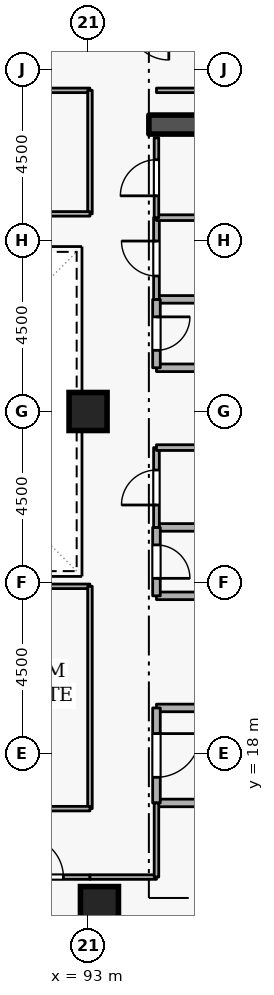
"""IFC4 building model, lengths in metres.
Left out: names, types, materials, properties, quantities, classifications, styles, units other than length and angle.
Written with IfcOpenShell. Run it as: python <this file> out.ifc"""

import sys

from ifc_helpers import new_model, si_unit, direction, frame, frame_2d, origin, origin_2d, place, context, subcontext, project, spatial, rectangle, extrude, element, fill, save


model = new_model("IFC4")
c1 = context("Model", 3, precision=1e-05, world=origin(), true_north=direction((0.0, 1.0)))
c2 = subcontext(c1, "Body", "Model", "MODEL_VIEW")
j1 = project(units=[si_unit("LENGTHUNIT", "METRE"), si_unit("PLANEANGLEUNIT", "RADIAN")], contexts=[c1])
p1 = place(None, origin())
s1 = spatial("IfcSite", under=j1, at=p1, CompositionType="ELEMENT")
p2 = place(p1, origin())
s2 = spatial("IfcBuilding", under=s1, at=p2, CompositionType="ELEMENT")
p3 = place(p2, frame((0.0, 0.0, 200.1)))
s3 = spatial("IfcBuildingStorey", under=s2, at=p3, CompositionType="ELEMENT", Elevation=200.1)
p4 = place(p3, frame((94.6, 34.55, 0.0), z_axis=(0.0, 0.0, 1.0), x_axis=(1.0, 0.0, 0.0)))
e1 = element("IfcWall", 1, at=p4, inside=s3, PredefinedType="SHEAR", context=c2, shape_type="SweptSolid", body=[
    extrude(rectangle(XDim=5.8, YDim=0.5, at=frame_2d((2.9, 0.0))), origin(), (0.0, 0.0, 1.0), 3.6),
])
for number, where, z_axis, x_axis in (
    (2, (93.3, 14.0, 0.0), (0.0, 0.0, 1.0), (1.0, 0.0, 0.0)),
    (3, (93.0, 27.0, 0.0), (0.0, 0.0, 1.0), (1.0, 0.0, 0.0)),
):
    element("IfcColumn", number, at=place(p3, frame(where, z_axis=z_axis, x_axis=x_axis)), inside=s3, PredefinedType="COLUMN", context=c2, shape_type="SweptSolid", body=[
        extrude(rectangle(XDim=1.0, YDim=1.0, at=origin_2d()), origin(), (0.0, 0.0, 1.0), 3.6),
    ])
p5 = place(p3, frame((94.8, 16.7, 0.0), z_axis=(0.0, 0.0, 1.0), x_axis=(1.0, 0.0, 0.0)))
e4 = element("IfcWall", 4, at=p5, inside=s3, PredefinedType="STANDARD", context=c2, shape_type="SweptSolid", body=[
    extrude(rectangle(XDim=5.7, YDim=0.2, at=frame_2d((2.85, 0.0))), origin(), (0.0, 0.0, 1.0), 3.32),
])
p6 = place(p3, frame((97.1, 19.2, 0.0), z_axis=(0.0, 0.0, 1.0), x_axis=(-1.0, 0.0, 0.0)))
e5 = element("IfcWall", 5, at=p6, inside=s3, PredefinedType="STANDARD", context=c2, shape_type="SweptSolid", body=[
    extrude(rectangle(XDim=2.3, YDim=0.2, at=frame_2d((1.15, 0.0))), origin(), (0.0, 0.0, 1.0), 2.525),
])
p7 = place(p3, frame((94.8, 19.2, 0.0), z_axis=(0.0, 0.0, 1.0), x_axis=(0.0, -1.0, 0.0)))
e6 = element("IfcWall", 6, at=p7, inside=s3, PredefinedType="STANDARD", context=c2, shape_type="SweptSolid", body=[
    extrude(rectangle(XDim=2.5, YDim=0.2, at=frame_2d((1.25, 0.0))), origin(), (0.0, 0.0, 1.0), 3.32),
])
p8 = place(p7, frame((0.675, 0.0, 0.0)))
e7 = element("IfcOpeningElement", 7, at=p8, cuts=e6, PredefinedType="OPENING", context=c2, shape_type="SweptSolid", body=[
    extrude(rectangle(XDim=1.15, YDim=2.1, at=frame_2d((0.575, 1.05))), frame((0.0, 0.11, 0.0), z_axis=(0.0, -1.0, 0.0), x_axis=(1.0, 0.0, 0.0)), (0.0, 0.0, 1.0), 0.22),
])
for number, where, z_axis, x_axis in (
    (8, (94.8, 28.15, 0.0), (0.0, 0.0, 1.0), (1.0, 0.0, 0.0)),
    (9, (96.85, 29.95, 0.0), (0.0, 0.0, 1.0), (-1.0, 0.0, 0.0)),
):
    element("IfcWall", number, at=place(p3, frame(where, z_axis=z_axis, x_axis=x_axis)), inside=s3, PredefinedType="STANDARD", context=c2, shape_type="SweptSolid", body=[
        extrude(rectangle(XDim=2.05, YDim=0.2, at=frame_2d((1.025, 0.0))), origin(), (0.0, 0.0, 1.0), 3.32),
    ])
p9 = place(p3, frame((94.8, 29.95, 0.0), z_axis=(0.0, 0.0, 1.0), x_axis=(0.0, -1.0, 0.0)))
e10 = element("IfcWall", 10, at=p9, inside=s3, PredefinedType="STANDARD", context=c2, shape_type="SweptSolid", body=[
    extrude(rectangle(XDim=1.8, YDim=0.2, at=frame_2d((0.9, 0.0))), origin(), (0.0, 0.0, 1.0), 3.32),
])
p10 = place(p9, frame((0.46, 0.0, 0.0)))
e11 = element("IfcOpeningElement", 11, at=p10, cuts=e10, PredefinedType="OPENING", context=c2, shape_type="SweptSolid", body=[
    extrude(rectangle(XDim=0.88, YDim=2.04, at=frame_2d((0.44, 1.02))), frame((0.0, 0.11, 0.0), z_axis=(0.0, -1.0, 0.0), x_axis=(1.0, 0.0, 0.0)), (0.0, 0.0, 1.0), 0.22),
])
for number, where, z_axis, x_axis in (
    (12, (94.8, 22.15, 0.0), (0.0, 0.0, 1.0), (1.0, 0.0, 0.0)),
    (13, (96.85, 23.95, 0.0), (0.0, 0.0, 1.0), (-1.0, 0.0, 0.0)),
):
    element("IfcWall", number, at=place(p3, frame(where, z_axis=z_axis, x_axis=x_axis)), inside=s3, PredefinedType="STANDARD", context=c2, shape_type="SweptSolid", body=[
        extrude(rectangle(XDim=2.05, YDim=0.2, at=frame_2d((1.025, 0.0))), origin(), (0.0, 0.0, 1.0), 3.32),
    ])
p11 = place(p3, frame((94.8, 23.95, 0.0), z_axis=(0.0, 0.0, 1.0), x_axis=(0.0, -1.0, 0.0)))
e14 = element("IfcWall", 14, at=p11, inside=s3, PredefinedType="STANDARD", context=c2, shape_type="SweptSolid", body=[
    extrude(rectangle(XDim=1.8, YDim=0.2, at=frame_2d((0.9, 0.0))), origin(), (0.0, 0.0, 1.0), 3.32),
])
p12 = place(p11, frame((0.46, 0.0, 0.0)))
e15 = element("IfcOpeningElement", 15, at=p12, cuts=e14, PredefinedType="OPENING", context=c2, shape_type="SweptSolid", body=[
    extrude(rectangle(XDim=0.88, YDim=2.04, at=frame_2d((0.44, 1.02))), frame((0.0, 0.11, 0.0), z_axis=(0.0, -1.0, 0.0), x_axis=(1.0, 0.0, 0.0)), (0.0, 0.0, 1.0), 0.22),
])
p13 = place(p3, frame((94.8, 23.95, 0.0), z_axis=(0.0, 0.0, 1.0), x_axis=(0.0, 1.0, 0.0)))
e16 = element("IfcWall", 16, at=p13, inside=s3, PredefinedType="PARTITIONING", context=c2, shape_type="SweptSolid", body=[
    extrude(rectangle(XDim=2.1, YDim=0.15, at=frame_2d((1.05, 0.0))), origin(), (0.0, 0.0, 1.0), 3.32),
])
p14 = place(p13, frame((0.59, 0.0, 0.0)))
e17 = element("IfcOpeningElement", 17, at=p14, cuts=e16, PredefinedType="OPENING", context=c2, shape_type="SweptSolid", body=[
    extrude(rectangle(XDim=0.92, YDim=2.08, at=frame_2d((0.46, 1.04))), frame((0.0, 0.085, 0.0), z_axis=(0.0, -1.0, 0.0), x_axis=(1.0, 0.0, 0.0)), (0.0, 0.0, 1.0), 0.17),
])
p15 = place(p3, frame((94.8, 26.05, 0.0), z_axis=(0.0, 0.0, 1.0), x_axis=(1.0, 0.0, 0.0)))
e18 = element("IfcWall", 18, at=p15, inside=s3, PredefinedType="PARTITIONING", context=c2, shape_type="SweptSolid", body=[
    extrude(rectangle(XDim=2.05, YDim=0.15, at=frame_2d((1.025, 0.0))), origin(), (0.0, 0.0, 1.0), 3.32),
])
p16 = place(p3, frame((94.8, 29.95, 0.0), z_axis=(0.0, 0.0, 1.0), x_axis=(0.0, 1.0, 0.0)))
e19 = element("IfcWall", 19, at=p16, inside=s3, PredefinedType="PARTITIONING", context=c2, shape_type="SweptSolid", body=[
    extrude(rectangle(XDim=2.15, YDim=0.15, at=frame_2d((1.075, 0.0))), origin(), (0.0, 0.0, 1.0), 3.32),
])
p17 = place(p16, frame((0.615, 0.0, 0.0)))
e20 = element("IfcOpeningElement", 20, at=p17, cuts=e19, PredefinedType="OPENING", context=c2, shape_type="SweptSolid", body=[
    extrude(rectangle(XDim=0.92, YDim=2.08, at=frame_2d((0.46, 1.04))), frame((0.0, 0.085, 0.0), z_axis=(0.0, -1.0, 0.0), x_axis=(1.0, 0.0, 0.0)), (0.0, 0.0, 1.0), 0.17),
])
p18 = place(p3, frame((94.8, 32.1, 0.0), z_axis=(0.0, 0.0, 1.0), x_axis=(1.0, 0.0, 0.0)))
e21 = element("IfcWall", 21, at=p18, inside=s3, PredefinedType="PARTITIONING", context=c2, shape_type="SweptSolid", body=[
    extrude(rectangle(XDim=2.05, YDim=0.15, at=frame_2d((1.025, 0.0))), origin(), (0.0, 0.0, 1.0), 3.32),
])
p19 = place(p3, frame((94.8, 32.1, 0.0), z_axis=(0.0, 0.0, 1.0), x_axis=(0.0, 1.0, 0.0)))
e22 = element("IfcWall", 22, at=p19, inside=s3, PredefinedType="PARTITIONING", context=c2, shape_type="SweptSolid", body=[
    extrude(rectangle(XDim=2.1, YDim=0.12, at=frame_2d((1.05, 0.0))), origin(), (0.0, 0.0, 1.0), 3.32),
])
p20 = place(p19, frame((0.575, 0.0, 0.0)))
e23 = element("IfcOpeningElement", 23, at=p20, cuts=e22, PredefinedType="OPENING", context=c2, shape_type="SweptSolid", body=[
    extrude(rectangle(XDim=0.95, YDim=2.1, at=frame_2d((0.475, 1.05))), frame((0.0, 0.07, 0.0), z_axis=(0.0, -1.0, 0.0), x_axis=(1.0, 0.0, 0.0)), (0.0, 0.0, 1.0), 0.14),
])
p21 = place(p3, frame((94.8, 35.45, 0.0), z_axis=(0.0, 0.0, 1.0), x_axis=(1.0, 0.0, 0.0)))
e24 = element("IfcWall", 24, at=p21, inside=s3, PredefinedType="PARTITIONING", context=c2, shape_type="SweptSolid", body=[
    extrude(rectangle(XDim=5.9, YDim=0.12, at=frame_2d((2.95, 0.0))), origin(), (0.0, 0.0, 1.0), 3.32),
])
p22 = place(p3, frame((90.6, 14.75, 0.0), z_axis=(0.0, 0.0, 1.0), x_axis=(1.0, 0.0, 0.0)))
e25 = element("IfcWall", 25, at=p22, inside=s3, PredefinedType="PARTITIONING", context=c2, shape_type="SweptSolid", body=[
    extrude(rectangle(XDim=2.45, YDim=0.12, at=frame_2d((1.225, 0.0))), origin(), (0.0, 0.0, 1.0), 3.32),
])
p23 = place(p22, frame((0.7, 0.0, 0.0)))
e26 = element("IfcOpeningElement", 26, at=p23, cuts=e25, PredefinedType="OPENING", context=c2, shape_type="SweptSolid", body=[
    extrude(rectangle(XDim=1.05, YDim=2.1, at=frame_2d((0.525, 1.05))), frame((0.0, 0.07, 0.0), z_axis=(0.0, -1.0, 0.0), x_axis=(1.0, 0.0, 0.0)), (0.0, 0.0, 1.0), 0.14),
])
p24 = place(p3, frame((93.05, 14.75, 0.0), z_axis=(0.0, 0.0, 1.0), x_axis=(1.0, 0.0, 0.0)))
e27 = element("IfcWall", 27, at=p24, inside=s3, PredefinedType="PARTITIONING", context=c2, shape_type="SweptSolid", body=[
    extrude(rectangle(XDim=1.75, YDim=0.12, at=frame_2d((0.875, 0.0))), origin(), (0.0, 0.0, 1.0), 3.32),
])
p25 = place(p3, frame((94.8, 14.75, 0.0), z_axis=(0.0, 0.0, 1.0), x_axis=(0.0, 1.0, 0.0)))
e28 = element("IfcWall", 28, at=p25, inside=s3, PredefinedType="PARTITIONING", context=c2, shape_type="SweptSolid", body=[
    extrude(rectangle(XDim=1.95, YDim=0.12, at=frame_2d((0.975, 0.0))), origin(), (0.0, 0.0, 1.0), 3.32),
])
p26 = place(p3, frame((83.95, 22.4, 0.0), z_axis=(0.0, 0.0, 1.0), x_axis=(1.0, 0.0, 0.0)))
e29 = element("IfcWall", 29, at=p26, inside=s3, PredefinedType="PARTITIONING", context=c2, shape_type="SweptSolid", body=[
    extrude(rectangle(XDim=9.1, YDim=0.12, at=frame_2d((4.55, 0.0))), origin(), (0.0, 0.0, 1.0), 3.32),
])
p27 = place(p3, frame((93.05, 22.4, 0.0), z_axis=(0.0, 0.0, 1.0), x_axis=(0.0, -1.0, 0.0)))
e30 = element("IfcWall", 30, at=p27, inside=s3, PredefinedType="PARTITIONING", context=c2, shape_type="SweptSolid", body=[
    extrude(rectangle(XDim=5.85, YDim=0.12, at=frame_2d((2.925, 0.0))), origin(), (0.0, 0.0, 1.0), 3.32),
])
p28 = place(p3, frame((93.05, 16.55, 0.0), z_axis=(0.0, 0.0, 1.0), x_axis=(-1.0, 0.0, 0.0)))
e31 = element("IfcWall", 31, at=p28, inside=s3, PredefinedType="PARTITIONING", context=c2, shape_type="SweptSolid", body=[
    extrude(rectangle(XDim=9.1, YDim=0.12, at=frame_2d((4.55, 0.0))), origin(), (0.0, 0.0, 1.0), 3.32),
])
p29 = place(p28, frame((4.075, 0.0, 0.0)))
e32 = element("IfcOpeningElement", 32, at=p29, cuts=e31, PredefinedType="OPENING", context=c2, shape_type="SweptSolid", body=[
    extrude(rectangle(XDim=0.95, YDim=2.1, at=frame_2d((0.475, 1.05))), frame((0.0, 0.07, 0.0), z_axis=(0.0, -1.0, 0.0), x_axis=(1.0, 0.0, 0.0)), (0.0, 0.0, 1.0), 0.14),
])
p30 = place(p3, frame((83.95, 35.45, 0.0), z_axis=(0.0, 0.0, 1.0), x_axis=(1.0, 0.0, 0.0)))
e33 = element("IfcWall", 33, at=p30, inside=s3, PredefinedType="PARTITIONING", context=c2, shape_type="SweptSolid", body=[
    extrude(rectangle(XDim=9.1, YDim=0.12, at=frame_2d((4.55, 0.0))), origin(), (0.0, 0.0, 1.0), 3.32),
])
p31 = place(p30, frame((4.075, 0.0, 0.0)))
e34 = element("IfcOpeningElement", 34, at=p31, cuts=e33, PredefinedType="OPENING", context=c2, shape_type="SweptSolid", body=[
    extrude(rectangle(XDim=0.95, YDim=2.1, at=frame_2d((0.475, 1.05))), frame((0.0, 0.07, 0.0), z_axis=(0.0, -1.0, 0.0), x_axis=(1.0, 0.0, 0.0)), (0.0, 0.0, 1.0), 0.14),
])
p32 = place(p3, frame((93.05, 35.45, 0.0), z_axis=(0.0, 0.0, 1.0), x_axis=(0.0, -1.0, 0.0)))
e35 = element("IfcWall", 35, at=p32, inside=s3, PredefinedType="PARTITIONING", context=c2, shape_type="SweptSolid", body=[
    extrude(rectangle(XDim=3.25, YDim=0.12, at=frame_2d((1.625, 0.0))), origin(), (0.0, 0.0, 1.0), 3.32),
])
p33 = place(p3, frame((93.05, 32.2, 0.0), z_axis=(0.0, 0.0, 1.0), x_axis=(-1.0, 0.0, 0.0)))
e36 = element("IfcWall", 36, at=p33, inside=s3, PredefinedType="PARTITIONING", context=c2, shape_type="SweptSolid", body=[
    extrude(rectangle(XDim=9.1, YDim=0.12, at=frame_2d((4.55, 0.0))), origin(), (0.0, 0.0, 1.0), 3.32),
])
p34 = place(p8, origin())
e37 = element("IfcDoor", 37, at=p34, inside=s3, OperationType="SINGLE_SWING_LEFT", PredefinedType="DOOR", context=c2, shape_type="SweptSolid", body=[
    extrude(rectangle(XDim=1.15, YDim=2.1, at=frame_2d((0.575, 1.05))), frame((0.0, 0.025, 0.0), z_axis=(0.0, -1.0, 0.0), x_axis=(1.0, 0.0, 0.0)), (0.0, 0.0, 1.0), 0.05),
])
fill(e7, e37)
p35 = place(p10, origin())
e38 = element("IfcDoor", 38, at=p35, inside=s3, OperationType="SINGLE_SWING_LEFT", PredefinedType="DOOR", context=c2, shape_type="SweptSolid", body=[
    extrude(rectangle(XDim=0.88, YDim=2.04, at=frame_2d((0.44, 1.02))), frame((0.0, 0.025, 0.0), z_axis=(0.0, -1.0, 0.0), x_axis=(1.0, 0.0, 0.0)), (0.0, 0.0, 1.0), 0.05),
])
fill(e11, e38)
p36 = place(p12, origin())
e39 = element("IfcDoor", 39, at=p36, inside=s3, OperationType="SINGLE_SWING_RIGHT", PredefinedType="DOOR", context=c2, shape_type="SweptSolid", body=[
    extrude(rectangle(XDim=0.88, YDim=2.04, at=frame_2d((0.44, 1.02))), frame((0.0, 0.025, 0.0), z_axis=(0.0, -1.0, 0.0), x_axis=(1.0, 0.0, 0.0)), (0.0, 0.0, 1.0), 0.05),
])
fill(e15, e39)
p37 = place(p14, origin())
e40 = element("IfcDoor", 40, at=p37, inside=s3, OperationType="SINGLE_SWING_LEFT", PredefinedType="DOOR", context=c2, shape_type="SweptSolid", body=[
    extrude(rectangle(XDim=0.92, YDim=2.08, at=frame_2d((0.46, 1.04))), frame((0.0, 0.025, 0.0), z_axis=(0.0, -1.0, 0.0), x_axis=(1.0, 0.0, 0.0)), (0.0, 0.0, 1.0), 0.05),
])
fill(e17, e40)
p38 = place(p17, origin())
e41 = element("IfcDoor", 41, at=p38, inside=s3, OperationType="SINGLE_SWING_RIGHT", PredefinedType="DOOR", context=c2, shape_type="SweptSolid", body=[
    extrude(rectangle(XDim=0.92, YDim=2.08, at=frame_2d((0.46, 1.04))), frame((0.0, 0.025, 0.0), z_axis=(0.0, -1.0, 0.0), x_axis=(1.0, 0.0, 0.0)), (0.0, 0.0, 1.0), 0.05),
])
fill(e20, e41)
p39 = place(p20, origin())
e42 = element("IfcDoor", 42, at=p39, inside=s3, OperationType="SINGLE_SWING_LEFT", PredefinedType="DOOR", context=c2, shape_type="SweptSolid", body=[
    extrude(rectangle(XDim=0.95, YDim=2.1, at=frame_2d((0.475, 1.05))), frame((0.0, 0.025, 0.0), z_axis=(0.0, -1.0, 0.0), x_axis=(1.0, 0.0, 0.0)), (0.0, 0.0, 1.0), 0.05),
])
fill(e23, e42)
p40 = place(p23, origin())
e43 = element("IfcDoor", 43, at=p40, inside=s3, OperationType="SINGLE_SWING_LEFT", PredefinedType="DOOR", context=c2, shape_type="SweptSolid", body=[
    extrude(rectangle(XDim=1.05, YDim=2.1, at=frame_2d((0.525, 1.05))), frame((0.0, 0.025, 0.0), z_axis=(0.0, -1.0, 0.0), x_axis=(1.0, 0.0, 0.0)), (0.0, 0.0, 1.0), 0.05),
])
fill(e26, e43)
save(model, sys.argv[1])
